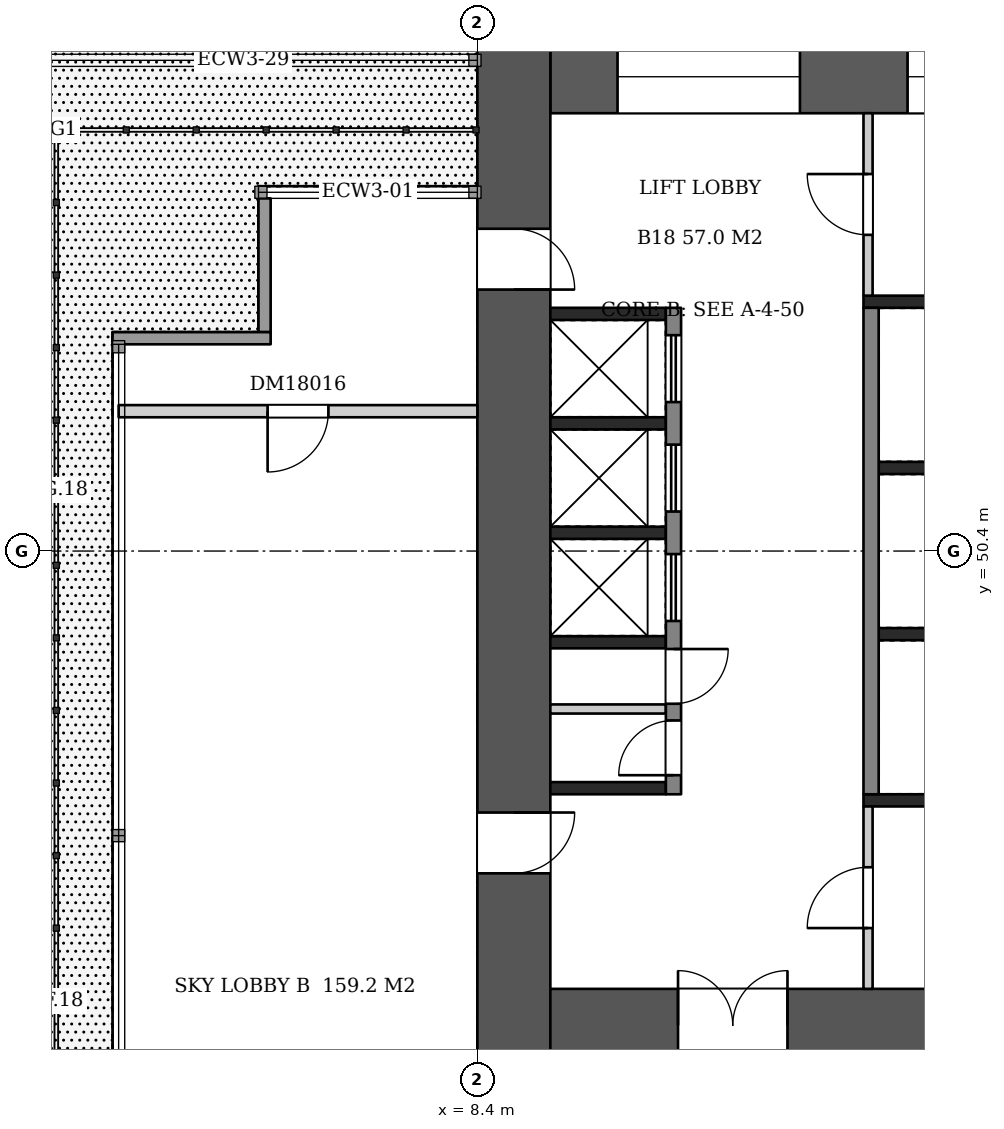
"""IFC4 building model, lengths in metres.
Left out: names, types, materials, properties, quantities, classifications, styles, units other than length and angle.
Written with IfcOpenShell. Run it as: python <this file> out.ifc"""

import sys

from ifc_helpers import new_model, si_unit, direction, frame, frame_2d, origin, place, context, subcontext, project, spatial, rectangle, extrude, element, fill, save


model = new_model("IFC4")
c1 = context("Model", 3, precision=1e-05, world=origin(), true_north=direction((0.0, 1.0)))
c2 = subcontext(c1, "Body", "Model", "MODEL_VIEW")
j1 = project(units=[si_unit("LENGTHUNIT", "METRE"), si_unit("PLANEANGLEUNIT", "RADIAN")], contexts=[c1])
p1 = place(None, origin())
s1 = spatial("IfcSite", under=j1, at=p1, CompositionType="ELEMENT")
p2 = place(p1, origin())
s2 = spatial("IfcBuilding", under=s1, at=p2, CompositionType="ELEMENT")
p3 = place(p2, frame((0.0, 0.0, 74.2)))
s3 = spatial("IfcBuildingStorey", under=s2, at=p3, CompositionType="ELEMENT", Elevation=74.2)
p4 = place(p3, frame((9.0, 58.8, 0.0), z_axis=(0.0, 0.0, 1.0), x_axis=(0.0, -1.0, 0.0)))
e1 = element("IfcWall", 1, at=p4, inside=s3, PredefinedType="SHEAR", context=c2, shape_type="SweptSolid", body=[
    extrude(rectangle(XDim=16.8, YDim=1.2, at=frame_2d((8.4, 0.0))), origin(), (0.0, 0.0, 1.0), 6.72),
])
p5 = place(p4, frame((3.1, 0.0, 0.0)))
e2 = element("IfcOpeningElement", 2, at=p5, cuts=e1, PredefinedType="OPENING", context=c2, shape_type="SweptSolid", body=[
    extrude(rectangle(XDim=1.0, YDim=2.1, at=frame_2d((0.5, 1.05))), frame((0.0, 0.61, 0.0), z_axis=(0.0, -1.0, 0.0), x_axis=(1.0, 0.0, 0.0)), (0.0, 0.0, 1.0), 1.22),
])
p6 = place(p4, frame((12.7, 0.0, 0.0)))
e3 = element("IfcOpeningElement", 3, at=p6, cuts=e1, PredefinedType="OPENING", context=c2, shape_type="SweptSolid", body=[
    extrude(rectangle(XDim=1.0, YDim=2.1, at=frame_2d((0.5, 1.05))), frame((0.0, 0.61, 0.0), z_axis=(0.0, -1.0, 0.0), x_axis=(1.0, 0.0, 0.0)), (0.0, 0.0, 1.0), 1.22),
])
p7 = place(p3, frame((9.6, 58.2, 0.0), z_axis=(0.0, 0.0, 1.0), x_axis=(1.0, 0.0, 0.0)))
e4 = element("IfcWall", 4, at=p7, inside=s3, PredefinedType="SHEAR", context=c2, shape_type="SweptSolid", body=[
    extrude(rectangle(XDim=14.4, YDim=1.2, at=frame_2d((7.2, 0.0))), origin(), (0.0, 0.0, 1.0), 6.72),
])
p8 = place(p7, frame((1.105, 0.0, 0.6)))
e5 = element("IfcOpeningElement", 5, at=p8, cuts=e4, PredefinedType="OPENING", context=c2, shape_type="SweptSolid", body=[
    extrude(rectangle(XDim=3.0, YDim=2.1, at=frame_2d((1.5, 1.05))), frame((0.0, 0.61, 0.0), z_axis=(0.0, -1.0, 0.0), x_axis=(1.0, 0.0, 0.0)), (0.0, 0.0, 1.0), 1.22),
])
p9 = place(p7, frame((5.875, 0.0, 0.6)))
e6 = element("IfcOpeningElement", 6, at=p9, cuts=e4, PredefinedType="OPENING", context=c2, shape_type="SweptSolid", body=[
    extrude(rectangle(XDim=2.4, YDim=2.1, at=frame_2d((1.2, 1.05))), frame((0.0, 0.61, 0.0), z_axis=(0.0, -1.0, 0.0), x_axis=(1.0, 0.0, 0.0)), (0.0, 0.0, 1.0), 1.22),
])
p10 = place(p7, frame((9.993, 0.0, 0.5)))
e7 = element("IfcOpeningElement", 7, at=p10, cuts=e4, PredefinedType="OPENING", context=c2, shape_type="SweptSolid", body=[
    extrude(rectangle(XDim=1.2, YDim=2.4, at=frame_2d((0.6, 1.2))), frame((0.0, 0.61, 0.0), z_axis=(0.0, -1.0, 0.0), x_axis=(1.0, 0.0, 0.0)), (0.0, 0.0, 1.0), 1.22),
])
p11 = place(p7, frame((12.197, 0.0, 0.5)))
e8 = element("IfcOpeningElement", 8, at=p11, cuts=e4, PredefinedType="OPENING", context=c2, shape_type="SweptSolid", body=[
    extrude(rectangle(XDim=1.2, YDim=2.4, at=frame_2d((0.6, 1.2))), frame((0.0, 0.61, 0.0), z_axis=(0.0, -1.0, 0.0), x_axis=(1.0, 0.0, 0.0)), (0.0, 0.0, 1.0), 1.22),
])
p12 = place(p3, frame((9.6, 42.6, 0.0), z_axis=(0.0, 0.0, 1.0), x_axis=(1.0, 0.0, 0.0)))
e9 = element("IfcWall", 9, at=p12, inside=s3, PredefinedType="SHEAR", context=c2, shape_type="SweptSolid", body=[
    extrude(rectangle(XDim=14.4, YDim=1.2, at=frame_2d((7.2, 0.0))), origin(), (0.0, 0.0, 1.0), 6.72),
])
p13 = place(p12, frame((2.1, 0.0, 0.0)))
e10 = element("IfcOpeningElement", 10, at=p13, cuts=e9, PredefinedType="OPENING", context=c2, shape_type="SweptSolid", body=[
    extrude(rectangle(XDim=1.8, YDim=2.1, at=frame_2d((0.9, 1.05))), frame((0.0, 0.61, 0.0), z_axis=(0.0, -1.0, 0.0), x_axis=(1.0, 0.0, 0.0)), (0.0, 0.0, 1.0), 1.22),
])
for number, where, z_axis, x_axis in (
    (11, (9.6, 54.3, 0.0), (0.0, 0.0, 1.0), (1.0, 0.0, 0.0)),
    (12, (9.6, 52.5, 0.0), (0.0, 0.0, 1.0), (1.0, 0.0, 0.0)),
    (13, (9.6, 50.7, 0.0), (0.0, 0.0, 1.0), (1.0, 0.0, 0.0)),
    (14, (9.6, 48.9, 0.0), (0.0, 0.0, 1.0), (1.0, 0.0, 0.0)),
    (15, (9.6, 46.5, 0.0), (0.0, 0.0, 1.0), (1.0, 0.0, 0.0)),
):
    element("IfcWall", number, at=place(p3, frame(where, z_axis=z_axis, x_axis=x_axis)), inside=s3, PredefinedType="SHEAR", context=c2, shape_type="SweptSolid", body=[
        extrude(rectangle(XDim=1.9, YDim=0.2, at=frame_2d((0.95, 0.0))), origin(), (0.0, 0.0, 1.0), 6.72),
    ])
p14 = place(p3, frame((9.6, 47.802, 0.0), z_axis=(0.0, 0.0, 1.0), x_axis=(1.0, 0.0, 0.0)))
e16 = element("IfcWall", 16, at=p14, inside=s3, PredefinedType="PARTITIONING", context=c2, shape_type="SweptSolid", body=[
    extrude(rectangle(XDim=1.9, YDim=0.15, at=frame_2d((0.95, 0.0))), origin(), (0.0, 0.0, 1.0), 6.72),
])
p15 = place(p3, frame((11.625, 54.4, 0.0), z_axis=(0.0, 0.0, 1.0), x_axis=(0.0, -1.0, 0.0)))
e17 = element("IfcWall", 17, at=p15, inside=s3, PredefinedType="SHEAR", context=c2, shape_type="SweptSolid", body=[
    extrude(rectangle(XDim=8.0, YDim=0.25, at=frame_2d((4.0, 0.0))), origin(), (0.0, 0.0, 1.0), 6.72),
])
p16 = place(p15, frame((0.45, 0.0, 0.0)))
e18 = element("IfcOpeningElement", 18, at=p16, cuts=e17, PredefinedType="OPENING", context=c2, shape_type="SweptSolid", body=[
    extrude(rectangle(XDim=1.1, YDim=2.1, at=frame_2d((0.55, 1.05))), frame((0.0, 0.135, 0.0), z_axis=(0.0, -1.0, 0.0), x_axis=(1.0, 0.0, 0.0)), (0.0, 0.0, 1.0), 0.27),
])
p17 = place(p15, frame((2.25, 0.0, 0.0)))
e19 = element("IfcOpeningElement", 19, at=p17, cuts=e17, PredefinedType="OPENING", context=c2, shape_type="SweptSolid", body=[
    extrude(rectangle(XDim=1.1, YDim=2.1, at=frame_2d((0.55, 1.05))), frame((0.0, 0.135, 0.0), z_axis=(0.0, -1.0, 0.0), x_axis=(1.0, 0.0, 0.0)), (0.0, 0.0, 1.0), 0.27),
])
p18 = place(p15, frame((4.05, 0.0, 0.0)))
e20 = element("IfcOpeningElement", 20, at=p18, cuts=e17, PredefinedType="OPENING", context=c2, shape_type="SweptSolid", body=[
    extrude(rectangle(XDim=1.1, YDim=2.1, at=frame_2d((0.55, 1.05))), frame((0.0, 0.135, 0.0), z_axis=(0.0, -1.0, 0.0), x_axis=(1.0, 0.0, 0.0)), (0.0, 0.0, 1.0), 0.27),
])
p19 = place(p15, frame((5.611, 0.0, 0.0)))
e21 = element("IfcOpeningElement", 21, at=p19, cuts=e17, PredefinedType="OPENING", context=c2, shape_type="SweptSolid", body=[
    extrude(rectangle(XDim=0.9, YDim=2.1, at=frame_2d((0.45, 1.05))), frame((0.0, 0.135, 0.0), z_axis=(0.0, -1.0, 0.0), x_axis=(1.0, 0.0, 0.0)), (0.0, 0.0, 1.0), 0.27),
])
p20 = place(p15, frame((6.786, 0.0, 0.0)))
e22 = element("IfcOpeningElement", 22, at=p20, cuts=e17, PredefinedType="OPENING", context=c2, shape_type="SweptSolid", body=[
    extrude(rectangle(XDim=0.9, YDim=2.1, at=frame_2d((0.45, 1.05))), frame((0.0, 0.135, 0.0), z_axis=(0.0, -1.0, 0.0), x_axis=(1.0, 0.0, 0.0)), (0.0, 0.0, 1.0), 0.27),
])
for number, where, z_axis, x_axis in (
    (23, (15.0, 51.767, 0.0), (0.0, 0.0, 1.0), (1.0, 0.0, 0.0)),
    (24, (15.0, 49.033, 0.0), (0.0, 0.0, 1.0), (1.0, 0.0, 0.0)),
):
    element("IfcWall", number, at=place(p3, frame(where, z_axis=z_axis, x_axis=x_axis)), inside=s3, PredefinedType="SHEAR", context=c2, shape_type="SweptSolid", body=[
        extrude(rectangle(XDim=1.9, YDim=0.2, at=frame_2d((0.95, 0.0))), origin(), (0.0, 0.0, 1.0), 6.72),
    ])
p21 = place(p3, frame((14.875, 54.4, 0.0), z_axis=(0.0, 0.0, 1.0), x_axis=(0.0, -1.0, 0.0)))
e25 = element("IfcWall", 25, at=p21, inside=s3, PredefinedType="SHEAR", context=c2, shape_type="SweptSolid", body=[
    extrude(rectangle(XDim=8.0, YDim=0.25, at=frame_2d((4.0, 0.0))), origin(), (0.0, 0.0, 1.0), 6.72),
])
p22 = place(p3, frame((14.75, 54.5, 0.0), z_axis=(0.0, 0.0, 1.0), x_axis=(1.0, 0.0, 0.0)))
e26 = element("IfcWall", 26, at=p22, inside=s3, PredefinedType="SHEAR", context=c2, shape_type="SweptSolid", body=[
    extrude(rectangle(XDim=2.4, YDim=0.2, at=frame_2d((1.2, 0.0))), origin(), (0.0, 0.0, 1.0), 6.72),
])
p23 = place(p3, frame((14.825, 57.6, 0.0), z_axis=(0.0, 0.0, 1.0), x_axis=(0.0, -1.0, 0.0)))
e27 = element("IfcWall", 27, at=p23, inside=s3, PredefinedType="PARTITIONING", context=c2, shape_type="SweptSolid", body=[
    extrude(rectangle(XDim=3.0, YDim=0.15, at=frame_2d((1.5, 0.0))), origin(), (0.0, 0.0, 1.0), 6.72),
])
p24 = place(p23, frame((1.0, 0.0, 0.0)))
e28 = element("IfcOpeningElement", 28, at=p24, cuts=e27, PredefinedType="OPENING", context=c2, shape_type="SweptSolid", body=[
    extrude(rectangle(XDim=1.0, YDim=2.1, at=frame_2d((0.5, 1.05))), frame((0.0, 0.085, 0.0), z_axis=(0.0, -1.0, 0.0), x_axis=(1.0, 0.0, 0.0)), (0.0, 0.0, 1.0), 0.17),
])
p25 = place(p3, frame((14.75, 46.3, 0.0), z_axis=(0.0, 0.0, 1.0), x_axis=(1.0, 0.0, 0.0)))
e29 = element("IfcWall", 29, at=p25, inside=s3, PredefinedType="SHEAR", context=c2, shape_type="SweptSolid", body=[
    extrude(rectangle(XDim=2.4, YDim=0.2, at=frame_2d((1.2, 0.0))), origin(), (0.0, 0.0, 1.0), 6.72),
])
p26 = place(p3, frame((14.825, 46.2, 0.0), z_axis=(0.0, 0.0, 1.0), x_axis=(0.0, -1.0, 0.0)))
e30 = element("IfcWall", 30, at=p26, inside=s3, PredefinedType="PARTITIONING", context=c2, shape_type="SweptSolid", body=[
    extrude(rectangle(XDim=3.0, YDim=0.15, at=frame_2d((1.5, 0.0))), origin(), (0.0, 0.0, 1.0), 6.72),
])
p27 = place(p26, frame((1.0, 0.0, 0.0)))
e31 = element("IfcOpeningElement", 31, at=p27, cuts=e30, PredefinedType="OPENING", context=c2, shape_type="SweptSolid", body=[
    extrude(rectangle(XDim=1.0, YDim=2.1, at=frame_2d((0.5, 1.05))), frame((0.0, 0.085, 0.0), z_axis=(0.0, -1.0, 0.0), x_axis=(1.0, 0.0, 0.0)), (0.0, 0.0, 1.0), 0.17),
])
p28 = place(p3, frame((2.5, 52.7, 0.0), z_axis=(0.0, 0.0, 1.0), x_axis=(1.0, 0.0, 0.0)))
e32 = element("IfcWall", 32, at=p28, inside=s3, PredefinedType="PARTITIONING", context=c2, shape_type="SweptSolid", body=[
    extrude(rectangle(XDim=5.9, YDim=0.2, at=frame_2d((2.95, 0.0))), origin(), (0.0, 0.0, 1.0), 6.72),
])
p29 = place(p28, frame((2.45, 0.0, 0.0)))
e33 = element("IfcOpeningElement", 33, at=p29, cuts=e32, PredefinedType="OPENING", context=c2, shape_type="SweptSolid", body=[
    extrude(rectangle(XDim=1.0, YDim=2.1, at=frame_2d((0.5, 1.05))), frame((0.0, 0.11, 0.0), z_axis=(0.0, -1.0, 0.0), x_axis=(1.0, 0.0, 0.0)), (0.0, 0.0, 1.0), 0.22),
])
p30 = place(p3, frame((4.9, 56.2, 0.0), z_axis=(0.0, 0.0, 1.0), x_axis=(0.0, -1.0, 0.0)))
e34 = element("IfcWall", 34, at=p30, inside=s3, PredefinedType="SOLIDWALL", context=c2, shape_type="SweptSolid", body=[
    extrude(rectangle(XDim=2.2, YDim=0.2, at=frame_2d((1.1, 0.0))), origin(), (0.0, 0.0, 1.0), 6.72),
])
p31 = place(p3, frame((5.0, 53.9, 0.0), z_axis=(0.0, 0.0, 1.0), x_axis=(-1.0, 0.0, 0.0)))
e35 = element("IfcWall", 35, at=p31, inside=s3, PredefinedType="SOLIDWALL", context=c2, shape_type="SweptSolid", body=[
    extrude(rectangle(XDim=2.6, YDim=0.2, at=frame_2d((1.3, 0.0))), origin(), (0.0, 0.0, 1.0), 6.72),
])
p32 = place(p5, origin())
e36 = element("IfcDoor", 36, at=p32, inside=s3, OperationType="SINGLE_SWING_RIGHT", PredefinedType="DOOR", context=c2, shape_type="SweptSolid", body=[
    extrude(rectangle(XDim=1.0, YDim=2.1, at=frame_2d((0.5, 1.05))), frame((0.0, 0.025, 0.0), z_axis=(0.0, -1.0, 0.0), x_axis=(1.0, 0.0, 0.0)), (0.0, 0.0, 1.0), 0.05),
])
fill(e2, e36)
p33 = place(p6, origin())
e37 = element("IfcDoor", 37, at=p33, inside=s3, OperationType="SINGLE_SWING_LEFT", PredefinedType="DOOR", context=c2, shape_type="SweptSolid", body=[
    extrude(rectangle(XDim=1.0, YDim=2.1, at=frame_2d((0.5, 1.05))), frame((0.0, 0.025, 0.0), z_axis=(0.0, -1.0, 0.0), x_axis=(1.0, 0.0, 0.0)), (0.0, 0.0, 1.0), 0.05),
])
fill(e3, e37)
p34 = place(p13, origin())
e38 = element("IfcDoor", 38, at=p34, inside=s3, OperationType="DOUBLE_DOOR_SINGLE_SWING", PredefinedType="DOOR", context=c2, shape_type="SweptSolid", body=[
    extrude(rectangle(XDim=1.8, YDim=2.1, at=frame_2d((0.9, 1.05))), frame((0.0, 0.025, 0.0), z_axis=(0.0, -1.0, 0.0), x_axis=(1.0, 0.0, 0.0)), (0.0, 0.0, 1.0), 0.05),
])
fill(e10, e38)
p35 = place(p16, origin())
e39 = element("IfcDoor", 39, at=p35, inside=s3, OperationType="DOUBLE_DOOR_SLIDING", PredefinedType="DOOR", context=c2, shape_type="SweptSolid", body=[
    extrude(rectangle(XDim=1.1, YDim=2.1, at=frame_2d((0.55, 1.05))), frame((0.0, 0.025, 0.0), z_axis=(0.0, -1.0, 0.0), x_axis=(1.0, 0.0, 0.0)), (0.0, 0.0, 1.0), 0.05),
])
fill(e18, e39)
p36 = place(p17, origin())
e40 = element("IfcDoor", 40, at=p36, inside=s3, OperationType="DOUBLE_DOOR_SLIDING", PredefinedType="DOOR", context=c2, shape_type="SweptSolid", body=[
    extrude(rectangle(XDim=1.1, YDim=2.1, at=frame_2d((0.55, 1.05))), frame((0.0, 0.025, 0.0), z_axis=(0.0, -1.0, 0.0), x_axis=(1.0, 0.0, 0.0)), (0.0, 0.0, 1.0), 0.05),
])
fill(e19, e40)
p37 = place(p18, origin())
e41 = element("IfcDoor", 41, at=p37, inside=s3, OperationType="DOUBLE_DOOR_SLIDING", PredefinedType="DOOR", context=c2, shape_type="SweptSolid", body=[
    extrude(rectangle(XDim=1.1, YDim=2.1, at=frame_2d((0.55, 1.05))), frame((0.0, 0.025, 0.0), z_axis=(0.0, -1.0, 0.0), x_axis=(1.0, 0.0, 0.0)), (0.0, 0.0, 1.0), 0.05),
])
fill(e20, e41)
p38 = place(p19, origin())
e42 = element("IfcDoor", 42, at=p38, inside=s3, OperationType="SINGLE_SWING_LEFT", PredefinedType="DOOR", context=c2, shape_type="SweptSolid", body=[
    extrude(rectangle(XDim=0.9, YDim=2.1, at=frame_2d((0.45, 1.05))), frame((0.0, 0.025, 0.0), z_axis=(0.0, -1.0, 0.0), x_axis=(1.0, 0.0, 0.0)), (0.0, 0.0, 1.0), 0.05),
])
fill(e21, e42)
p39 = place(p20, frame((0.9, 0.0, 0.0), z_axis=(0.0, 0.0, 1.0), x_axis=(-1.0, 0.0, 0.0)))
e43 = element("IfcDoor", 43, at=p39, inside=s3, OperationType="SINGLE_SWING_LEFT", PredefinedType="DOOR", context=c2, shape_type="SweptSolid", body=[
    extrude(rectangle(XDim=0.9, YDim=2.1, at=frame_2d((0.45, 1.05))), frame((0.0, 0.025, 0.0), z_axis=(0.0, -1.0, 0.0), x_axis=(1.0, 0.0, 0.0)), (0.0, 0.0, 1.0), 0.05),
])
fill(e22, e43)
p40 = place(p24, frame((1.0, 0.0, 0.0), z_axis=(0.0, 0.0, 1.0), x_axis=(-1.0, 0.0, 0.0)))
e44 = element("IfcDoor", 44, at=p40, inside=s3, OperationType="SINGLE_SWING_RIGHT", PredefinedType="DOOR", context=c2, shape_type="SweptSolid", body=[
    extrude(rectangle(XDim=1.0, YDim=2.1, at=frame_2d((0.5, 1.05))), frame((0.0, 0.025, 0.0), z_axis=(0.0, -1.0, 0.0), x_axis=(1.0, 0.0, 0.0)), (0.0, 0.0, 1.0), 0.05),
])
fill(e28, e44)
p41 = place(p27, frame((1.0, 0.0, 0.0), z_axis=(0.0, 0.0, 1.0), x_axis=(-1.0, 0.0, 0.0)))
e45 = element("IfcDoor", 45, at=p41, inside=s3, OperationType="SINGLE_SWING_LEFT", PredefinedType="DOOR", context=c2, shape_type="SweptSolid", body=[
    extrude(rectangle(XDim=1.0, YDim=2.1, at=frame_2d((0.5, 1.05))), frame((0.0, 0.025, 0.0), z_axis=(0.0, -1.0, 0.0), x_axis=(1.0, 0.0, 0.0)), (0.0, 0.0, 1.0), 0.05),
])
fill(e31, e45)
p42 = place(p8, origin())
e46 = element("IfcWindow", 46, at=p42, inside=s3, PartitioningType="SINGLE_PANEL", PredefinedType="WINDOW", context=c2, shape_type="SweptSolid", body=[
    extrude(rectangle(XDim=3.0, YDim=2.1, at=frame_2d((1.5, 1.05))), frame((0.0, 0.03, 0.0), z_axis=(0.0, -1.0, 0.0), x_axis=(1.0, 0.0, 0.0)), (0.0, 0.0, 1.0), 0.06),
])
fill(e5, e46)
p43 = place(p9, origin())
e47 = element("IfcWindow", 47, at=p43, inside=s3, PartitioningType="SINGLE_PANEL", PredefinedType="WINDOW", context=c2, shape_type="SweptSolid", body=[
    extrude(rectangle(XDim=2.4, YDim=2.1, at=frame_2d((1.2, 1.05))), frame((0.0, 0.03, 0.0), z_axis=(0.0, -1.0, 0.0), x_axis=(1.0, 0.0, 0.0)), (0.0, 0.0, 1.0), 0.06),
])
fill(e6, e47)
p44 = place(p29, frame((1.0, 0.0, 0.0), z_axis=(0.0, 0.0, 1.0), x_axis=(-1.0, 0.0, 0.0)))
e48 = element("IfcDoor", 48, at=p44, inside=s3, OperationType="SINGLE_SWING_RIGHT", PredefinedType="DOOR", context=c2, shape_type="SweptSolid", body=[
    extrude(rectangle(XDim=1.0, YDim=2.1, at=frame_2d((0.5, 1.05))), frame((0.0, 0.025, 0.0), z_axis=(0.0, -1.0, 0.0), x_axis=(1.0, 0.0, 0.0)), (0.0, 0.0, 1.0), 0.05),
])
fill(e33, e48)
save(model, sys.argv[1])
